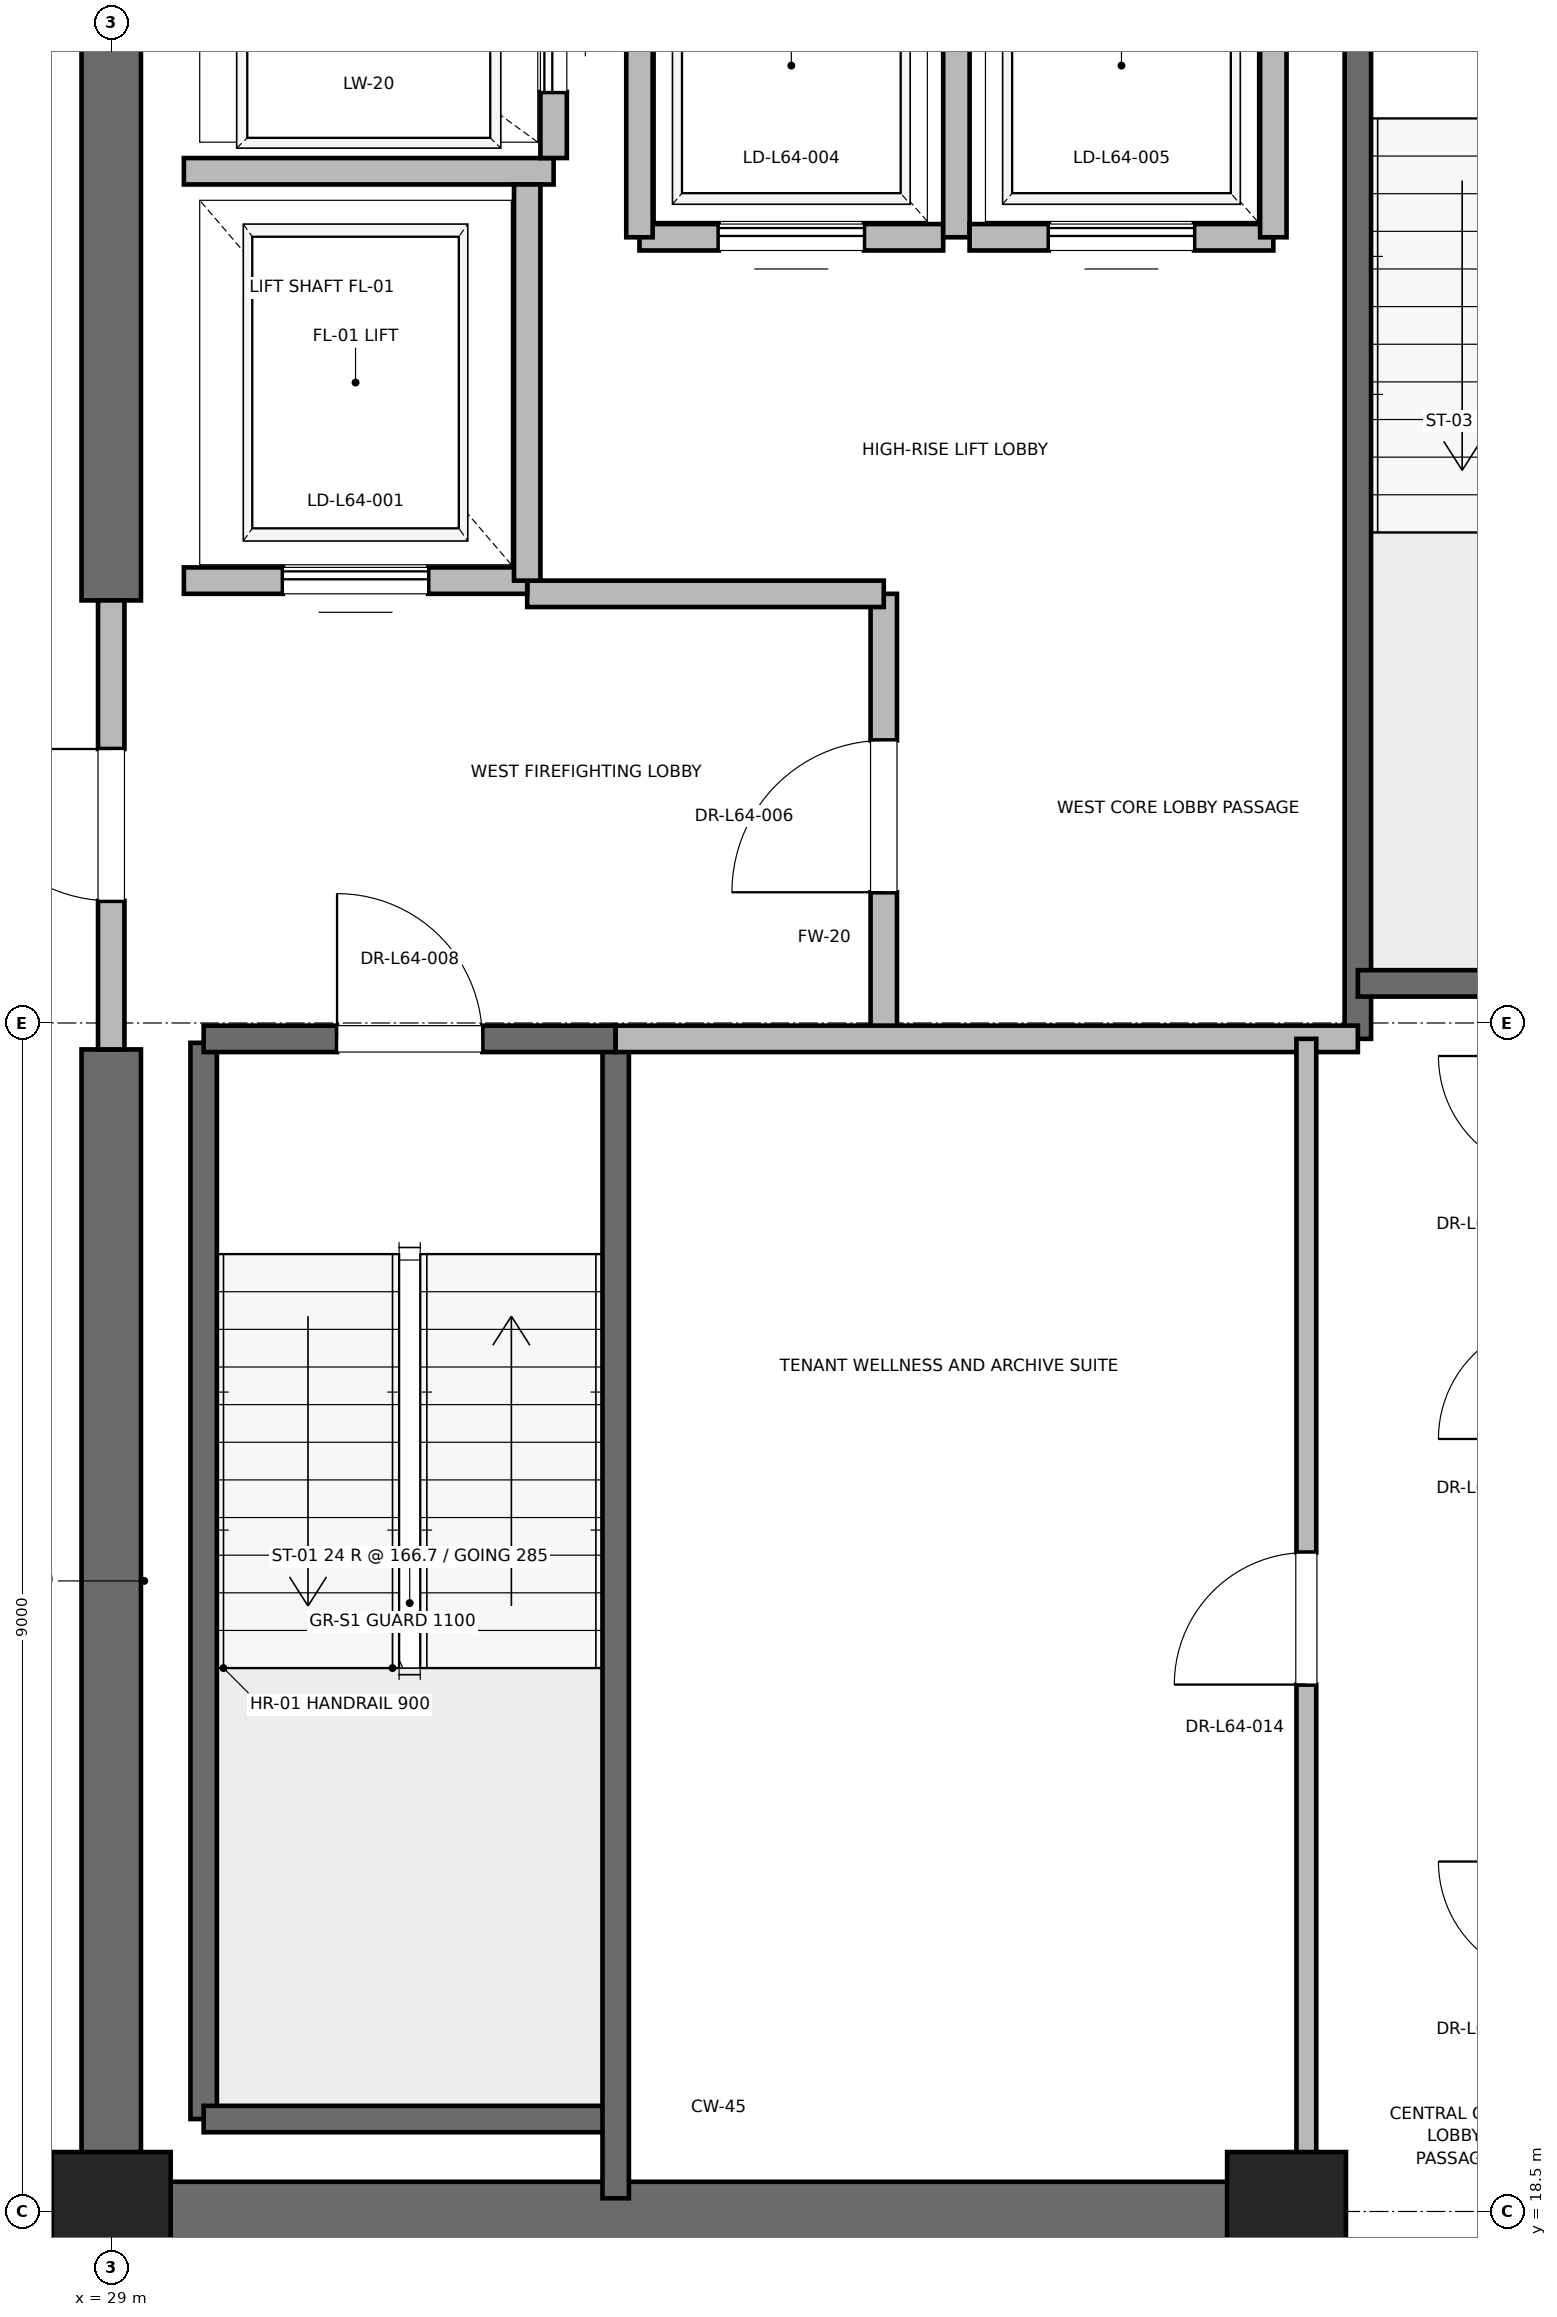
"""IFC4 building model, lengths in metres.
Left out: names, types, materials, properties, quantities, classifications, styles, units other than length and angle.
Written with IfcOpenShell. Run it as: python <this file> out.ifc"""

import sys

from ifc_helpers import new_model, si_unit, direction, frame, frame_2d, origin, origin_2d, place, context, subcontext, project, spatial, rectangle, extrude, element, fill, save


model = new_model("IFC4")
c1 = context("Model", 3, precision=1e-05, world=origin(), true_north=direction((0.0, 1.0)))
c2 = subcontext(c1, "Body", "Model", "MODEL_VIEW")
j1 = project(units=[si_unit("LENGTHUNIT", "METRE"), si_unit("PLANEANGLEUNIT", "RADIAN")], contexts=[c1])
p1 = place(None, origin())
s1 = spatial("IfcSite", under=j1, at=p1, CompositionType="ELEMENT")
p2 = place(p1, origin())
s2 = spatial("IfcBuilding", under=s1, at=p2, CompositionType="ELEMENT")
p3 = place(p2, frame((0.0, 0.0, 275.2)))
s3 = spatial("IfcBuildingStorey", under=s2, at=p3, CompositionType="ELEMENT", Elevation=275.2)
for number, where, z_axis, x_axis in (
    (1, (29.0, 18.5, 0.0), (0.0, 0.0, 1.0), (1.0, 0.0, 0.0)),
    (2, (37.9, 18.5, 0.0), (0.0, 0.0, 1.0), (1.0, 0.0, 0.0)),
):
    element("IfcColumn", number, at=place(p3, frame(where, z_axis=z_axis, x_axis=x_axis)), inside=s3, PredefinedType="PILASTER", context=c2, shape_type="SweptSolid", body=[
        extrude(rectangle(XDim=0.9, YDim=0.9, at=origin_2d()), origin(), (0.0, 0.0, 1.0), 4.0),
    ])
p4 = place(p3, frame((29.0, 18.5, 0.0), z_axis=(0.0, 0.0, 1.0), x_axis=(1.0, 0.0, 0.0)))
e3 = element("IfcWall", 3, at=p4, inside=s3, PredefinedType="SHEAR", context=c2, shape_type="SweptSolid", body=[
    extrude(rectangle(XDim=9.2, YDim=0.45, at=frame_2d((4.6, 0.0))), origin(), (0.0, 0.0, 1.0), 3.785),
])
p5 = place(p3, frame((29.0, 18.5, 0.0), z_axis=(0.0, 0.0, 1.0), x_axis=(0.0, 1.0, 0.0)))
e4 = element("IfcWall", 4, at=p5, inside=s3, PredefinedType="SHEAR", context=c2, shape_type="SweptSolid", body=[
    extrude(rectangle(XDim=8.8, YDim=0.45, at=frame_2d((4.4, 0.0))), origin(), (0.0, 0.0, 1.0), 3.785),
])
p6 = place(p3, frame((29.0, 30.7, 0.0), z_axis=(0.0, 0.0, 1.0), x_axis=(0.0, 1.0, 0.0)))
e5 = element("IfcWall", 5, at=p6, inside=s3, PredefinedType="SHEAR", context=c2, shape_type="SweptSolid", body=[
    extrude(rectangle(XDim=5.8, YDim=0.45, at=frame_2d((2.9, 0.0))), origin(), (0.0, 0.0, 1.0), 3.785),
])
p7 = place(p3, frame((29.7, 19.2, 0.0), z_axis=(0.0, 0.0, 1.0), x_axis=(0.0, 1.0, 0.0)))
e6 = element("IfcWall", 6, at=p7, inside=s3, PredefinedType="SOLIDWALL", context=c2, shape_type="SweptSolid", body=[
    extrude(rectangle(XDim=8.15, YDim=0.2, at=frame_2d((4.075, 0.0))), origin(), (0.0, 0.0, 1.0), 3.785),
])
p8 = place(p3, frame((29.7, 19.2, 0.0), z_axis=(0.0, 0.0, 1.0), x_axis=(1.0, 0.0, 0.0)))
e7 = element("IfcWall", 7, at=p8, inside=s3, PredefinedType="SOLIDWALL", context=c2, shape_type="SweptSolid", body=[
    extrude(rectangle(XDim=3.12, YDim=0.2, at=frame_2d((1.56, 0.0))), origin(), (0.0, 0.0, 1.0), 3.785),
])
p9 = place(p3, frame((32.82, 18.6, 0.0), z_axis=(0.0, 0.0, 1.0), x_axis=(0.0, 1.0, 0.0)))
e8 = element("IfcWall", 8, at=p9, inside=s3, PredefinedType="SOLIDWALL", context=c2, shape_type="SweptSolid", body=[
    extrude(rectangle(XDim=8.78, YDim=0.2, at=frame_2d((4.39, 0.0))), origin(), (0.0, 0.0, 1.0), 3.785),
])
p10 = place(p3, frame((29.7, 27.38, 0.0), z_axis=(0.0, 0.0, 1.0), x_axis=(1.0, 0.0, 0.0)))
e9 = element("IfcWall", 9, at=p10, inside=s3, PredefinedType="SOLIDWALL", context=c2, shape_type="SweptSolid", body=[
    extrude(rectangle(XDim=3.12, YDim=0.2, at=frame_2d((1.56, 0.0))), origin(), (0.0, 0.0, 1.0), 3.785),
])
p11 = place(p10, frame((1.01, 0.0, 0.0)))
e10 = element("IfcOpeningElement", 10, at=p11, cuts=e9, PredefinedType="OPENING", context=c2, shape_type="SweptSolid", body=[
    extrude(rectangle(XDim=1.1, YDim=2.15, at=frame_2d((0.55, 1.075))), frame((0.0, 0.1, 0.0), z_axis=(0.0, -1.0, 0.0), x_axis=(1.0, 0.0, 0.0)), (0.0, 0.0, 1.0), 0.2),
])
p12 = place(p3, frame((38.44, 27.38, 0.0), z_axis=(0.0, 0.0, 1.0), x_axis=(0.0, 1.0, 0.0)))
e11 = element("IfcWall", 11, at=p12, inside=s3, PredefinedType="SOLIDWALL", context=c2, shape_type="SweptSolid", body=[
    extrude(rectangle(XDim=8.87, YDim=0.2, at=frame_2d((4.435, 0.0))), origin(), (0.0, 0.0, 1.0), 3.785),
])
p13 = place(p3, frame((38.44, 27.8, 0.0), z_axis=(0.0, 0.0, 1.0), x_axis=(1.0, 0.0, 0.0)))
e12 = element("IfcWall", 12, at=p13, inside=s3, PredefinedType="SOLIDWALL", context=c2, shape_type="SweptSolid", body=[
    extrude(rectangle(XDim=3.32, YDim=0.2, at=frame_2d((1.66, 0.0))), origin(), (0.0, 0.0, 1.0), 3.785),
])
p14 = place(p3, frame((34.85, 27.38, 0.0), z_axis=(0.0, 0.0, 1.0), x_axis=(0.0, 1.0, 0.0)))
e13 = element("IfcWall", 13, at=p14, inside=s3, PredefinedType="PARTITIONING", context=c2, shape_type="SweptSolid", body=[
    extrude(rectangle(XDim=3.37, YDim=0.2, at=frame_2d((1.685, 0.0))), origin(), (0.0, 0.0, 1.0), 3.785),
])
p15 = place(p14, frame((1.11, 0.0, 0.0)))
e14 = element("IfcOpeningElement", 14, at=p15, cuts=e13, PredefinedType="OPENING", context=c2, shape_type="SweptSolid", body=[
    extrude(rectangle(XDim=1.15, YDim=2.2, at=frame_2d((0.575, 1.1))), frame((0.0, 0.1, 0.0), z_axis=(0.0, -1.0, 0.0), x_axis=(1.0, 0.0, 0.0)), (0.0, 0.0, 1.0), 0.2),
])
p16 = place(p3, frame((29.0, 27.3, 0.0), z_axis=(0.0, 0.0, 1.0), x_axis=(0.0, 1.0, 0.0)))
e15 = element("IfcWall", 15, at=p16, inside=s3, PredefinedType="PARTITIONING", context=c2, shape_type="SweptSolid", body=[
    extrude(rectangle(XDim=3.4, YDim=0.2, at=frame_2d((1.7, 0.0))), origin(), (0.0, 0.0, 1.0), 2.865),
])
p17 = place(p16, frame((1.125, 0.0, 0.0)))
e16 = element("IfcOpeningElement", 16, at=p17, cuts=e15, PredefinedType="OPENING", context=c2, shape_type="SweptSolid", body=[
    extrude(rectangle(XDim=1.15, YDim=2.2, at=frame_2d((0.575, 1.1))), frame((0.0, 0.1, 0.0), z_axis=(0.0, -1.0, 0.0), x_axis=(1.0, 0.0, 0.0)), (0.0, 0.0, 1.0), 0.2),
])
p18 = place(p3, frame((32.82, 27.38, 0.0), z_axis=(0.0, 0.0, 1.0), x_axis=(1.0, 0.0, 0.0)))
e17 = element("IfcWall", 17, at=p18, inside=s3, PredefinedType="PARTITIONING", context=c2, shape_type="SweptSolid", body=[
    extrude(rectangle(XDim=5.62, YDim=0.2, at=frame_2d((2.81, 0.0))), origin(), (0.0, 0.0, 1.0), 3.785),
])
p19 = place(p3, frame((32.15, 30.75, 0.0), z_axis=(0.0, 0.0, 1.0), x_axis=(1.0, 0.0, 0.0)))
e18 = element("IfcWall", 18, at=p19, inside=s3, PredefinedType="PARTITIONING", context=c2, shape_type="SweptSolid", body=[
    extrude(rectangle(XDim=2.7, YDim=0.2, at=frame_2d((1.35, 0.0))), origin(), (0.0, 0.0, 1.0), 3.785),
])
p20 = place(p3, frame((29.55, 30.85, 0.0), z_axis=(0.0, 0.0, 1.0), x_axis=(1.0, 0.0, 0.0)))
e19 = element("IfcWall", 19, at=p20, inside=s3, PredefinedType="SOLIDWALL", context=c2, shape_type="SweptSolid", body=[
    extrude(rectangle(XDim=2.6, YDim=0.2, at=frame_2d((1.3, 0.0))), origin(), (0.0, 0.0, 1.0), 2.865),
])
p21 = place(p20, frame((0.75, 0.0, 0.0)))
e20 = element("IfcOpeningElement", 20, at=p21, cuts=e19, PredefinedType="OPENING", context=c2, shape_type="SweptSolid", body=[
    extrude(rectangle(XDim=1.1, YDim=2.2, at=frame_2d((0.55, 1.1))), frame((0.0, 0.1, 0.0), z_axis=(0.0, -1.0, 0.0), x_axis=(1.0, 0.0, 0.0)), (0.0, 0.0, 1.0), 0.2),
])
p22 = place(p3, frame((29.55, 33.95, 0.0), z_axis=(0.0, 0.0, 1.0), x_axis=(1.0, 0.0, 0.0)))
e21 = element("IfcWall", 21, at=p22, inside=s3, PredefinedType="SOLIDWALL", context=c2, shape_type="SweptSolid", body=[
    extrude(rectangle(XDim=2.8, YDim=0.2, at=frame_2d((1.4, 0.0))), origin(), (0.0, 0.0, 1.0), 3.785),
])
p23 = place(p3, frame((32.15, 30.85, 0.0), z_axis=(0.0, 0.0, 1.0), x_axis=(0.0, 1.0, 0.0)))
e22 = element("IfcWall", 22, at=p23, inside=s3, PredefinedType="SOLIDWALL", context=c2, shape_type="SweptSolid", body=[
    extrude(rectangle(XDim=3.0, YDim=0.2, at=frame_2d((1.5, 0.0))), origin(), (0.0, 0.0, 1.0), 3.785),
])
p24 = place(p3, frame((32.35, 34.05, 0.0), z_axis=(0.0, 0.0, 1.0), x_axis=(0.0, 1.0, 0.0)))
e23 = element("IfcWall", 23, at=p24, inside=s3, PredefinedType="SOLIDWALL", context=c2, shape_type="SweptSolid", body=[
    extrude(rectangle(XDim=2.1, YDim=0.2, at=frame_2d((1.05, 0.0))), origin(), (0.0, 0.0, 1.0), 3.785),
])
p25 = place(p24, frame((0.5, 0.0, 0.0)))
e24 = element("IfcOpeningElement", 24, at=p25, cuts=e23, PredefinedType="OPENING", context=c2, shape_type="SweptSolid", body=[
    extrude(rectangle(XDim=1.1, YDim=2.2, at=frame_2d((0.55, 1.1))), frame((0.0, 0.1, 0.0), z_axis=(0.0, -1.0, 0.0), x_axis=(1.0, 0.0, 0.0)), (0.0, 0.0, 1.0), 0.2),
])
p26 = place(p3, frame((33.0, 33.45, 0.0), z_axis=(0.0, 0.0, 1.0), x_axis=(1.0, 0.0, 0.0)))
e25 = element("IfcWall", 25, at=p26, inside=s3, PredefinedType="SOLIDWALL", context=c2, shape_type="SweptSolid", body=[
    extrude(rectangle(XDim=2.3, YDim=0.2, at=frame_2d((1.15, 0.0))), origin(), (0.0, 0.0, 1.0), 3.785),
])
p27 = place(p26, frame((0.6, 0.0, 0.0)))
e26 = element("IfcOpeningElement", 26, at=p27, cuts=e25, PredefinedType="OPENING", context=c2, shape_type="SweptSolid", body=[
    extrude(rectangle(XDim=1.1, YDim=2.2, at=frame_2d((0.55, 1.1))), frame((0.0, 0.1, 0.0), z_axis=(0.0, -1.0, 0.0), x_axis=(1.0, 0.0, 0.0)), (0.0, 0.0, 1.0), 0.2),
])
p28 = place(p3, frame((33.0, 36.05, 0.0), z_axis=(0.0, 0.0, 1.0), x_axis=(0.0, -1.0, 0.0)))
e27 = element("IfcWall", 27, at=p28, inside=s3, PredefinedType="SOLIDWALL", context=c2, shape_type="SweptSolid", body=[
    extrude(rectangle(XDim=2.6, YDim=0.2, at=frame_2d((1.3, 0.0))), origin(), (0.0, 0.0, 1.0), 3.785),
])
p29 = place(p3, frame((35.4, 33.45, 0.0), z_axis=(0.0, 0.0, 1.0), x_axis=(0.0, 1.0, 0.0)))
e28 = element("IfcWall", 28, at=p29, inside=s3, PredefinedType="SOLIDWALL", context=c2, shape_type="SweptSolid", body=[
    extrude(rectangle(XDim=2.6, YDim=0.2, at=frame_2d((1.3, 0.0))), origin(), (0.0, 0.0, 1.0), 2.865),
])
p30 = place(p3, frame((35.5, 33.45, 0.0), z_axis=(0.0, 0.0, 1.0), x_axis=(1.0, 0.0, 0.0)))
e29 = element("IfcWall", 29, at=p30, inside=s3, PredefinedType="SOLIDWALL", context=c2, shape_type="SweptSolid", body=[
    extrude(rectangle(XDim=2.3, YDim=0.2, at=frame_2d((1.15, 0.0))), origin(), (0.0, 0.0, 1.0), 3.785),
])
p31 = place(p30, frame((0.6, 0.0, 0.0)))
e30 = element("IfcOpeningElement", 30, at=p31, cuts=e29, PredefinedType="OPENING", context=c2, shape_type="SweptSolid", body=[
    extrude(rectangle(XDim=1.1, YDim=2.2, at=frame_2d((0.55, 1.1))), frame((0.0, 0.1, 0.0), z_axis=(0.0, -1.0, 0.0), x_axis=(1.0, 0.0, 0.0)), (0.0, 0.0, 1.0), 0.2),
])
p32 = place(p3, frame((37.8, 33.45, 0.0), z_axis=(0.0, 0.0, 1.0), x_axis=(0.0, 1.0, 0.0)))
e31 = element("IfcWall", 31, at=p32, inside=s3, PredefinedType="SOLIDWALL", context=c2, shape_type="SweptSolid", body=[
    extrude(rectangle(XDim=2.6, YDim=0.2, at=frame_2d((1.3, 0.0))), origin(), (0.0, 0.0, 1.0), 2.865),
])
p33 = place(p3, frame((38.05, 18.6, 0.0), z_axis=(0.0, 0.0, 1.0), x_axis=(0.0, 1.0, 0.0)))
e32 = element("IfcWall", 32, at=p33, inside=s3, PredefinedType="PARTITIONING", context=c2, shape_type="SweptSolid", body=[
    extrude(rectangle(XDim=8.78, YDim=0.15, at=frame_2d((4.39, 0.0))), origin(), (0.0, 0.0, 1.0), 2.85),
])
p34 = place(p33, frame((3.89, 0.0, 0.0)))
e33 = element("IfcOpeningElement", 33, at=p34, cuts=e32, PredefinedType="OPENING", context=c2, shape_type="SweptSolid", body=[
    extrude(rectangle(XDim=1.0, YDim=2.15, at=frame_2d((0.5, 1.075))), frame((0.0, 0.075, 0.0), z_axis=(0.0, -1.0, 0.0), x_axis=(1.0, 0.0, 0.0)), (0.0, 0.0, 1.0), 0.15),
])
p35 = place(p11, origin())
e34 = element("IfcDoor", 34, at=p35, inside=s3, OperationType="SINGLE_SWING_LEFT", PredefinedType="DOOR", context=c2, shape_type="SweptSolid", body=[
    extrude(rectangle(XDim=1.1, YDim=2.15, at=frame_2d((0.55, 1.075))), frame((0.0, 0.025, 0.0), z_axis=(0.0, -1.0, 0.0), x_axis=(1.0, 0.0, 0.0)), (0.0, 0.0, 1.0), 0.05),
])
fill(e10, e34)
p36 = place(p15, origin())
e35 = element("IfcDoor", 35, at=p36, inside=s3, OperationType="SINGLE_SWING_LEFT", PredefinedType="DOOR", context=c2, shape_type="SweptSolid", body=[
    extrude(rectangle(XDim=1.15, YDim=2.2, at=frame_2d((0.575, 1.1))), frame((0.0, 0.025, 0.0), z_axis=(0.0, -1.0, 0.0), x_axis=(1.0, 0.0, 0.0)), (0.0, 0.0, 1.0), 0.05),
])
fill(e14, e35)
p37 = place(p17, origin())
e36 = element("IfcDoor", 36, at=p37, inside=s3, OperationType="SINGLE_SWING_RIGHT", PredefinedType="DOOR", context=c2, shape_type="SweptSolid", body=[
    extrude(rectangle(XDim=1.15, YDim=2.2, at=frame_2d((0.575, 1.1))), frame((0.0, 0.025, 0.0), z_axis=(0.0, -1.0, 0.0), x_axis=(1.0, 0.0, 0.0)), (0.0, 0.0, 1.0), 0.05),
])
fill(e16, e36)
p38 = place(p21, origin())
e37 = element("IfcDoor", 37, at=p38, inside=s3, OperationType="SLIDING_TO_RIGHT", PredefinedType="DOOR", context=c2, shape_type="SweptSolid", body=[
    extrude(rectangle(XDim=1.1, YDim=2.2, at=frame_2d((0.55, 1.1))), frame((0.0, 0.025, 0.0), z_axis=(0.0, -1.0, 0.0), x_axis=(1.0, 0.0, 0.0)), (0.0, 0.0, 1.0), 0.05),
])
fill(e20, e37)
p39 = place(p25, origin())
e38 = element("IfcDoor", 38, at=p39, inside=s3, OperationType="SLIDING_TO_RIGHT", PredefinedType="DOOR", context=c2, shape_type="SweptSolid", body=[
    extrude(rectangle(XDim=1.1, YDim=2.2, at=frame_2d((0.55, 1.1))), frame((0.0, 0.025, 0.0), z_axis=(0.0, -1.0, 0.0), x_axis=(1.0, 0.0, 0.0)), (0.0, 0.0, 1.0), 0.05),
])
fill(e24, e38)
p40 = place(p27, origin())
e39 = element("IfcDoor", 39, at=p40, inside=s3, OperationType="SLIDING_TO_RIGHT", PredefinedType="DOOR", context=c2, shape_type="SweptSolid", body=[
    extrude(rectangle(XDim=1.1, YDim=2.2, at=frame_2d((0.55, 1.1))), frame((0.0, 0.025, 0.0), z_axis=(0.0, -1.0, 0.0), x_axis=(1.0, 0.0, 0.0)), (0.0, 0.0, 1.0), 0.05),
])
fill(e26, e39)
p41 = place(p31, origin())
e40 = element("IfcDoor", 40, at=p41, inside=s3, OperationType="SLIDING_TO_RIGHT", PredefinedType="DOOR", context=c2, shape_type="SweptSolid", body=[
    extrude(rectangle(XDim=1.1, YDim=2.2, at=frame_2d((0.55, 1.1))), frame((0.0, 0.025, 0.0), z_axis=(0.0, -1.0, 0.0), x_axis=(1.0, 0.0, 0.0)), (0.0, 0.0, 1.0), 0.05),
])
fill(e30, e40)
p42 = place(p34, origin())
e41 = element("IfcDoor", 41, at=p42, inside=s3, OperationType="SINGLE_SWING_LEFT", PredefinedType="DOOR", context=c2, shape_type="SweptSolid", body=[
    extrude(rectangle(XDim=1.0, YDim=2.15, at=frame_2d((0.5, 1.075))), frame((0.0, 0.025, 0.0), z_axis=(0.0, -1.0, 0.0), x_axis=(1.0, 0.0, 0.0)), (0.0, 0.0, 1.0), 0.05),
])
fill(e33, e41)
save(model, sys.argv[1])
